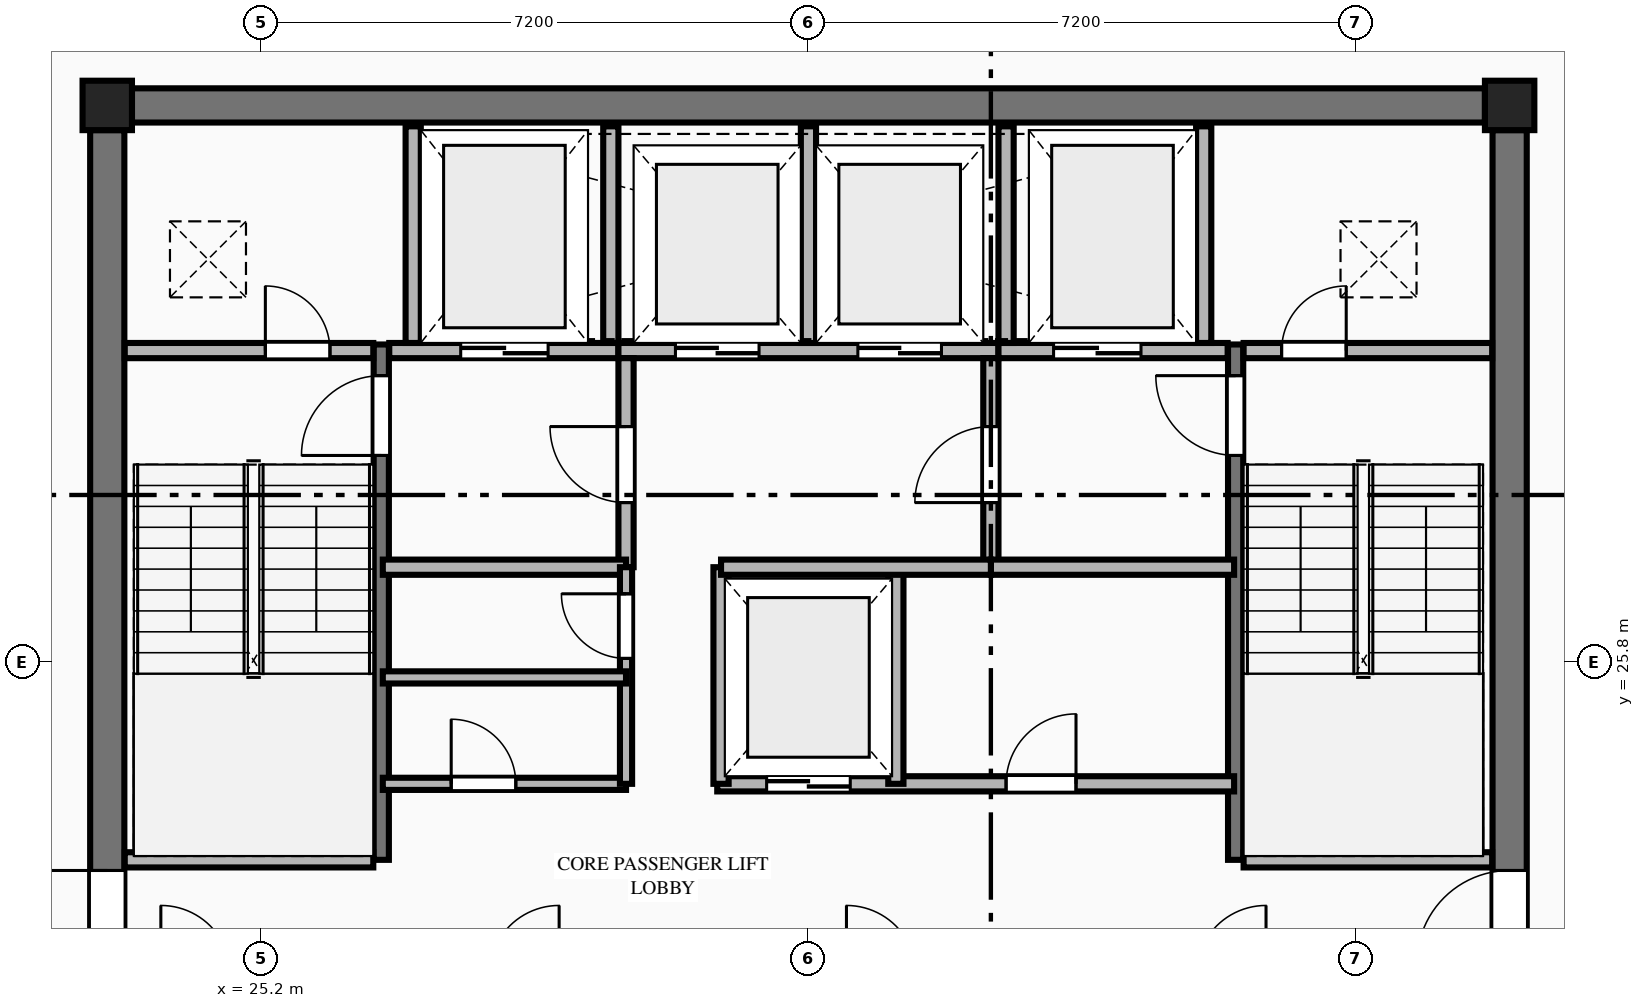
"""IFC4 building model, lengths in metres.
Left out: names, types, materials, properties, quantities, classifications, styles, units other than length and angle.
Written with IfcOpenShell. Run it as: python <this file> out.ifc"""

import sys

from ifc_helpers import new_model, si_unit, direction, frame, frame_2d, origin, origin_2d, place, context, subcontext, project, spatial, rectangle, extrude, element, fill, save


model = new_model("IFC4")
c1 = context("Model", 3, precision=1e-05, world=origin(), true_north=direction((0.0, 1.0)))
c2 = subcontext(c1, "Body", "Model", "MODEL_VIEW")
j1 = project(units=[si_unit("LENGTHUNIT", "METRE"), si_unit("PLANEANGLEUNIT", "RADIAN")], contexts=[c1])
p1 = place(None, origin())
s1 = spatial("IfcSite", under=j1, at=p1, CompositionType="ELEMENT")
p2 = place(p1, origin())
s2 = spatial("IfcBuilding", under=s1, at=p2, CompositionType="ELEMENT")
p3 = place(p2, frame((0.0, 0.0, 256.2)))
s3 = spatial("IfcBuildingStorey", under=s2, at=p3, CompositionType="ELEMENT", Elevation=256.2)
for number, where, z_axis, x_axis in (
    (1, (41.625, 33.125, 0.0), (0.0, 0.0, 1.0), (1.0, 0.0, 0.0)),
    (2, (23.175, 33.125, 0.0), (0.0, 0.0, 1.0), (1.0, 0.0, 0.0)),
):
    element("IfcColumn", number, at=place(p3, frame(where, z_axis=z_axis, x_axis=x_axis)), inside=s3, PredefinedType="COLUMN", context=c2, shape_type="SweptSolid", body=[
        extrude(rectangle(XDim=0.65, YDim=0.65, at=origin_2d()), origin(), (0.0, 0.0, 1.0), 3.65),
    ])
p4 = place(p3, frame((23.5, 33.125, 0.0), z_axis=(0.0, 0.0, 1.0), x_axis=(1.0, 0.0, 0.0)))
e3 = element("IfcWall", 3, at=p4, inside=s3, PredefinedType="SHEAR", context=c2, shape_type="SweptSolid", body=[
    extrude(rectangle(XDim=17.8, YDim=0.45, at=frame_2d((8.9, 0.0))), origin(), (0.0, 0.0, 1.0), 3.45),
])
p5 = place(p3, frame((23.175, 19.0, 0.0), z_axis=(0.0, 0.0, 1.0), x_axis=(0.0, 1.0, 0.0)))
e4 = element("IfcWall", 4, at=p5, inside=s3, PredefinedType="SHEAR", context=c2, shape_type="SweptSolid", body=[
    extrude(rectangle(XDim=13.8, YDim=0.45, at=frame_2d((6.9, 0.0))), origin(), (0.0, 0.0, 1.0), 3.45),
])
p6 = place(p5, frame((2.84, 0.0, 0.0)))
e5 = element("IfcOpeningElement", 5, at=p6, cuts=e4, PredefinedType="OPENING", context=c2, shape_type="SweptSolid", body=[
    extrude(rectangle(XDim=1.22, YDim=2.25, at=frame_2d((0.61, 1.125))), frame((0.0, 0.235, 0.0), z_axis=(0.0, -1.0, 0.0), x_axis=(1.0, 0.0, 0.0)), (0.0, 0.0, 1.0), 0.47),
])
p7 = place(p3, frame((41.625, 19.0, 0.0), z_axis=(0.0, 0.0, 1.0), x_axis=(0.0, 1.0, 0.0)))
e6 = element("IfcWall", 6, at=p7, inside=s3, PredefinedType="SHEAR", context=c2, shape_type="SweptSolid", body=[
    extrude(rectangle(XDim=13.8, YDim=0.45, at=frame_2d((6.9, 0.0))), origin(), (0.0, 0.0, 1.0), 3.45),
])
p8 = place(p7, frame((2.84, 0.0, 0.0)))
e7 = element("IfcOpeningElement", 7, at=p8, cuts=e6, PredefinedType="OPENING", context=c2, shape_type="SweptSolid", body=[
    extrude(rectangle(XDim=1.22, YDim=2.25, at=frame_2d((0.61, 1.125))), frame((0.0, 0.235, 0.0), z_axis=(0.0, -1.0, 0.0), x_axis=(1.0, 0.0, 0.0)), (0.0, 0.0, 1.0), 0.47),
])
p9 = place(p3, frame((26.78, 23.2, 0.0), z_axis=(0.0, 0.0, 1.0), x_axis=(0.0, 1.0, 0.0)))
e8 = element("IfcWall", 8, at=p9, inside=s3, PredefinedType="SHEAR", context=c2, shape_type="SweptSolid", body=[
    extrude(rectangle(XDim=6.78, YDim=0.2, at=frame_2d((3.39, 0.0))), origin(), (0.0, 0.0, 1.0), 3.65),
])
p10 = place(p9, frame((5.32, 0.0, 0.0)))
e9 = element("IfcOpeningElement", 9, at=p10, cuts=e8, PredefinedType="OPENING", context=c2, shape_type="SweptSolid", body=[
    extrude(rectangle(XDim=1.05, YDim=2.15, at=frame_2d((0.525, 1.075))), frame((0.0, 0.11, 0.0), z_axis=(0.0, -1.0, 0.0), x_axis=(1.0, 0.0, 0.0)), (0.0, 0.0, 1.0), 0.22),
])
p11 = place(p3, frame((23.405, 23.2, 0.0), z_axis=(0.0, 0.0, 1.0), x_axis=(1.0, 0.0, 0.0)))
e10 = element("IfcWall", 10, at=p11, inside=s3, PredefinedType="PLUMBINGWALL", context=c2, shape_type="SweptSolid", body=[
    extrude(rectangle(XDim=3.27, YDim=0.2, at=frame_2d((1.635, 0.0))), origin(), (0.0, 0.0, 1.0), 3.45),
])
p12 = place(p3, frame((38.02, 23.2, 0.0), z_axis=(0.0, 0.0, 1.0), x_axis=(0.0, 1.0, 0.0)))
e11 = element("IfcWall", 11, at=p12, inside=s3, PredefinedType="SHEAR", context=c2, shape_type="SweptSolid", body=[
    extrude(rectangle(XDim=6.78, YDim=0.2, at=frame_2d((3.39, 0.0))), origin(), (0.0, 0.0, 1.0), 3.65),
])
p13 = place(p12, frame((5.32, 0.0, 0.0)))
e12 = element("IfcOpeningElement", 12, at=p13, cuts=e11, PredefinedType="OPENING", context=c2, shape_type="SweptSolid", body=[
    extrude(rectangle(XDim=1.05, YDim=2.15, at=frame_2d((0.525, 1.075))), frame((0.0, 0.11, 0.0), z_axis=(0.0, -1.0, 0.0), x_axis=(1.0, 0.0, 0.0)), (0.0, 0.0, 1.0), 0.22),
])
p14 = place(p3, frame((38.125, 23.2, 0.0), z_axis=(0.0, 0.0, 1.0), x_axis=(1.0, 0.0, 0.0)))
e13 = element("IfcWall", 13, at=p14, inside=s3, PredefinedType="PLUMBINGWALL", context=c2, shape_type="SweptSolid", body=[
    extrude(rectangle(XDim=3.27, YDim=0.2, at=frame_2d((1.635, 0.0))), origin(), (0.0, 0.0, 1.0), 3.45),
])
p15 = place(p3, frame((23.405, 29.9, 0.0), z_axis=(0.0, 0.0, 1.0), x_axis=(1.0, 0.0, 0.0)))
e14 = element("IfcWall", 14, at=p15, inside=s3, PredefinedType="PLUMBINGWALL", context=c2, shape_type="SweptSolid", body=[
    extrude(rectangle(XDim=3.27, YDim=0.2, at=frame_2d((1.635, 0.0))), origin(), (0.0, 0.0, 1.0), 3.45),
])
p16 = place(p15, frame((1.85, 0.0, 0.0)))
e15 = element("IfcOpeningElement", 15, at=p16, cuts=e14, PredefinedType="OPENING", context=c2, shape_type="SweptSolid", body=[
    extrude(rectangle(XDim=0.85, YDim=2.05, at=frame_2d((0.425, 1.025))), frame((0.0, 0.11, 0.0), z_axis=(0.0, -1.0, 0.0), x_axis=(1.0, 0.0, 0.0)), (0.0, 0.0, 1.0), 0.22),
])
p17 = place(p3, frame((26.885, 29.9, 0.0), z_axis=(0.0, 0.0, 1.0), x_axis=(1.0, 0.0, 0.0)))
e16 = element("IfcWall", 16, at=p17, inside=s3, PredefinedType="PLUMBINGWALL", context=c2, shape_type="SweptSolid", body=[
    extrude(rectangle(XDim=3.015, YDim=0.2, at=frame_2d((1.507, 0.0))), origin(), (0.0, 0.0, 1.0), 3.45),
])
p18 = place(p17, frame((0.94, 0.0, 0.0)))
e17 = element("IfcOpeningElement", 17, at=p18, cuts=e16, PredefinedType="OPENING", context=c2, shape_type="SweptSolid", body=[
    extrude(rectangle(XDim=1.15, YDim=2.2, at=frame_2d((0.575, 1.1))), frame((0.0, 0.11, 0.0), z_axis=(0.0, -1.0, 0.0), x_axis=(1.0, 0.0, 0.0)), (0.0, 0.0, 1.0), 0.22),
])
p19 = place(p3, frame((29.9, 29.9, 0.0), z_axis=(0.0, 0.0, 1.0), x_axis=(1.0, 0.0, 0.0)))
e18 = element("IfcWall", 18, at=p19, inside=s3, PredefinedType="PLUMBINGWALL", context=c2, shape_type="SweptSolid", body=[
    extrude(rectangle(XDim=5.0, YDim=0.2, at=frame_2d((2.5, 0.0))), origin(), (0.0, 0.0, 1.0), 3.45),
])
p20 = place(p19, frame((0.75, 0.0, 0.0)))
e19 = element("IfcOpeningElement", 19, at=p20, cuts=e18, PredefinedType="OPENING", context=c2, shape_type="SweptSolid", body=[
    extrude(rectangle(XDim=1.1, YDim=2.2, at=frame_2d((0.55, 1.1))), frame((0.0, 0.11, 0.0), z_axis=(0.0, -1.0, 0.0), x_axis=(1.0, 0.0, 0.0)), (0.0, 0.0, 1.0), 0.22),
])
p21 = place(p19, frame((3.15, 0.0, 0.0)))
e20 = element("IfcOpeningElement", 20, at=p21, cuts=e18, PredefinedType="OPENING", context=c2, shape_type="SweptSolid", body=[
    extrude(rectangle(XDim=1.1, YDim=2.2, at=frame_2d((0.55, 1.1))), frame((0.0, 0.11, 0.0), z_axis=(0.0, -1.0, 0.0), x_axis=(1.0, 0.0, 0.0)), (0.0, 0.0, 1.0), 0.22),
])
p22 = place(p3, frame((34.9, 29.9, 0.0), z_axis=(0.0, 0.0, 1.0), x_axis=(1.0, 0.0, 0.0)))
e21 = element("IfcWall", 21, at=p22, inside=s3, PredefinedType="PLUMBINGWALL", context=c2, shape_type="SweptSolid", body=[
    extrude(rectangle(XDim=3.015, YDim=0.2, at=frame_2d((1.508, 0.0))), origin(), (0.0, 0.0, 1.0), 3.45),
])
p23 = place(p22, frame((0.725, 0.0, 0.0)))
e22 = element("IfcOpeningElement", 22, at=p23, cuts=e21, PredefinedType="OPENING", context=c2, shape_type="SweptSolid", body=[
    extrude(rectangle(XDim=1.15, YDim=2.2, at=frame_2d((0.575, 1.1))), frame((0.0, 0.11, 0.0), z_axis=(0.0, -1.0, 0.0), x_axis=(1.0, 0.0, 0.0)), (0.0, 0.0, 1.0), 0.22),
])
p24 = place(p3, frame((38.125, 29.9, 0.0), z_axis=(0.0, 0.0, 1.0), x_axis=(1.0, 0.0, 0.0)))
e23 = element("IfcWall", 23, at=p24, inside=s3, PredefinedType="PLUMBINGWALL", context=c2, shape_type="SweptSolid", body=[
    extrude(rectangle(XDim=3.27, YDim=0.2, at=frame_2d((1.635, 0.0))), origin(), (0.0, 0.0, 1.0), 3.45),
])
p25 = place(p24, frame((0.5, 0.0, 0.0)))
e24 = element("IfcOpeningElement", 24, at=p25, cuts=e23, PredefinedType="OPENING", context=c2, shape_type="SweptSolid", body=[
    extrude(rectangle(XDim=0.85, YDim=2.05, at=frame_2d((0.425, 1.025))), frame((0.0, 0.11, 0.0), z_axis=(0.0, -1.0, 0.0), x_axis=(1.0, 0.0, 0.0)), (0.0, 0.0, 1.0), 0.22),
])
for number, where, z_axis, x_axis in (
    (25, (27.2, 30.0, 0.0), (0.0, 0.0, 1.0), (0.0, 1.0, 0.0)),
    (26, (29.8, 30.0, 0.0), (0.0, 0.0, 1.0), (0.0, 1.0, 0.0)),
    (27, (32.4, 30.0, 0.0), (0.0, 0.0, 1.0), (0.0, 1.0, 0.0)),
    (28, (35.0, 30.0, 0.0), (0.0, 0.0, 1.0), (0.0, 1.0, 0.0)),
    (29, (37.6, 30.0, 0.0), (0.0, 0.0, 1.0), (0.0, 1.0, 0.0)),
):
    element("IfcWall", number, at=place(p3, frame(where, z_axis=z_axis, x_axis=x_axis)), inside=s3, PredefinedType="PLUMBINGWALL", context=c2, shape_type="SweptSolid", body=[
        extrude(rectangle(XDim=2.85, YDim=0.2, at=frame_2d((1.425, 0.0))), origin(), (0.0, 0.0, 1.0), 3.45),
    ])
p26 = place(p3, frame((30.0, 27.05, 0.0), z_axis=(0.0, 0.0, 1.0), x_axis=(0.0, 1.0, 0.0)))
e30 = element("IfcWall", 30, at=p26, inside=s3, PredefinedType="PLUMBINGWALL", context=c2, shape_type="SweptSolid", body=[
    extrude(rectangle(XDim=2.75, YDim=0.2, at=frame_2d((1.375, 0.0))), origin(), (0.0, 0.0, 1.0), 3.45),
])
p27 = place(p26, frame((0.85, 0.0, 0.0)))
e31 = element("IfcOpeningElement", 31, at=p27, cuts=e30, PredefinedType="OPENING", context=c2, shape_type="SweptSolid", body=[
    extrude(rectangle(XDim=1.0, YDim=2.15, at=frame_2d((0.5, 1.075))), frame((0.0, 0.11, 0.0), z_axis=(0.0, -1.0, 0.0), x_axis=(1.0, 0.0, 0.0)), (0.0, 0.0, 1.0), 0.22),
])
p28 = place(p3, frame((26.8, 27.05, 0.0), z_axis=(0.0, 0.0, 1.0), x_axis=(1.0, 0.0, 0.0)))
e32 = element("IfcWall", 32, at=p28, inside=s3, PredefinedType="PLUMBINGWALL", context=c2, shape_type="SweptSolid", body=[
    extrude(rectangle(XDim=3.2, YDim=0.2, at=frame_2d((1.6, 0.0))), origin(), (0.0, 0.0, 1.0), 3.45),
])
p29 = place(p3, frame((34.8, 27.05, 0.0), z_axis=(0.0, 0.0, 1.0), x_axis=(0.0, 1.0, 0.0)))
e33 = element("IfcWall", 33, at=p29, inside=s3, PredefinedType="PLUMBINGWALL", context=c2, shape_type="SweptSolid", body=[
    extrude(rectangle(XDim=2.75, YDim=0.2, at=frame_2d((1.375, 0.0))), origin(), (0.0, 0.0, 1.0), 3.45),
])
p30 = place(p29, frame((0.85, 0.0, 0.0)))
e34 = element("IfcOpeningElement", 34, at=p30, cuts=e33, PredefinedType="OPENING", context=c2, shape_type="SweptSolid", body=[
    extrude(rectangle(XDim=1.0, YDim=2.15, at=frame_2d((0.5, 1.075))), frame((0.0, 0.11, 0.0), z_axis=(0.0, -1.0, 0.0), x_axis=(1.0, 0.0, 0.0)), (0.0, 0.0, 1.0), 0.22),
])
p31 = place(p3, frame((34.8, 27.05, 0.0), z_axis=(0.0, 0.0, 1.0), x_axis=(1.0, 0.0, 0.0)))
e35 = element("IfcWall", 35, at=p31, inside=s3, PredefinedType="PLUMBINGWALL", context=c2, shape_type="SweptSolid", body=[
    extrude(rectangle(XDim=3.2, YDim=0.2, at=frame_2d((1.6, 0.0))), origin(), (0.0, 0.0, 1.0), 3.45),
])
p32 = place(p3, frame((26.8, 24.2, 0.0), z_axis=(0.0, 0.0, 1.0), x_axis=(1.0, 0.0, 0.0)))
e36 = element("IfcWall", 36, at=p32, inside=s3, PredefinedType="PARTITIONING", context=c2, shape_type="SweptSolid", body=[
    extrude(rectangle(XDim=3.2, YDim=0.16, at=frame_2d((1.6, 0.0))), origin(), (0.0, 0.0, 1.0), 3.45),
])
p33 = place(p32, frame((0.9, 0.0, 0.0)))
e37 = element("IfcOpeningElement", 37, at=p33, cuts=e36, PredefinedType="OPENING", context=c2, shape_type="SweptSolid", body=[
    extrude(rectangle(XDim=0.85, YDim=2.05, at=frame_2d((0.425, 1.025))), frame((0.0, 0.09, 0.0), z_axis=(0.0, -1.0, 0.0), x_axis=(1.0, 0.0, 0.0)), (0.0, 0.0, 1.0), 0.18),
])
p34 = place(p3, frame((30.0, 24.2, 0.0), z_axis=(0.0, 0.0, 1.0), x_axis=(0.0, 1.0, 0.0)))
e38 = element("IfcWall", 38, at=p34, inside=s3, PredefinedType="PARTITIONING", context=c2, shape_type="SweptSolid", body=[
    extrude(rectangle(XDim=2.85, YDim=0.16, at=frame_2d((1.425, 0.0))), origin(), (0.0, 0.0, 1.0), 3.45),
])
p35 = place(p34, frame((1.65, 0.0, 0.0)))
e39 = element("IfcOpeningElement", 39, at=p35, cuts=e38, PredefinedType="OPENING", context=c2, shape_type="SweptSolid", body=[
    extrude(rectangle(XDim=0.85, YDim=2.05, at=frame_2d((0.425, 1.025))), frame((0.0, 0.09, 0.0), z_axis=(0.0, -1.0, 0.0), x_axis=(1.0, 0.0, 0.0)), (0.0, 0.0, 1.0), 0.18),
])
p36 = place(p3, frame((31.2, 24.2, 0.0), z_axis=(0.0, 0.0, 1.0), x_axis=(1.0, 0.0, 0.0)))
e40 = element("IfcWall", 40, at=p36, inside=s3, PredefinedType="PLUMBINGWALL", context=c2, shape_type="SweptSolid", body=[
    extrude(rectangle(XDim=6.8, YDim=0.2, at=frame_2d((3.4, 0.0))), origin(), (0.0, 0.0, 1.0), 3.45),
])
p37 = place(p36, frame((0.65, 0.0, 0.0)))
e41 = element("IfcOpeningElement", 41, at=p37, cuts=e40, PredefinedType="OPENING", context=c2, shape_type="SweptSolid", body=[
    extrude(rectangle(XDim=1.1, YDim=2.2, at=frame_2d((0.55, 1.1))), frame((0.0, 0.11, 0.0), z_axis=(0.0, -1.0, 0.0), x_axis=(1.0, 0.0, 0.0)), (0.0, 0.0, 1.0), 0.22),
])
p38 = place(p36, frame((3.8, 0.0, 0.0)))
e42 = element("IfcOpeningElement", 42, at=p38, cuts=e40, PredefinedType="OPENING", context=c2, shape_type="SweptSolid", body=[
    extrude(rectangle(XDim=0.92, YDim=2.15, at=frame_2d((0.46, 1.075))), frame((0.0, 0.11, 0.0), z_axis=(0.0, -1.0, 0.0), x_axis=(1.0, 0.0, 0.0)), (0.0, 0.0, 1.0), 0.22),
])
for number, where, z_axis, x_axis in (
    (43, (31.25, 24.2, 0.0), (0.0, 0.0, 1.0), (0.0, 1.0, 0.0)),
    (44, (33.55, 24.2, 0.0), (0.0, 0.0, 1.0), (0.0, 1.0, 0.0)),
):
    element("IfcWall", number, at=place(p3, frame(where, z_axis=z_axis, x_axis=x_axis)), inside=s3, PredefinedType="PLUMBINGWALL", context=c2, shape_type="SweptSolid", body=[
        extrude(rectangle(XDim=2.85, YDim=0.2, at=frame_2d((1.425, 0.0))), origin(), (0.0, 0.0, 1.0), 3.45),
    ])
p39 = place(p3, frame((31.25, 27.05, 0.0), z_axis=(0.0, 0.0, 1.0), x_axis=(1.0, 0.0, 0.0)))
e45 = element("IfcWall", 45, at=p39, inside=s3, PredefinedType="PLUMBINGWALL", context=c2, shape_type="SweptSolid", body=[
    extrude(rectangle(XDim=3.55, YDim=0.2, at=frame_2d((1.775, 0.0))), origin(), (0.0, 0.0, 1.0), 3.45),
])
p40 = place(p3, frame((26.8, 25.6, 0.0), z_axis=(0.0, 0.0, 1.0), x_axis=(1.0, 0.0, 0.0)))
e46 = element("IfcWall", 46, at=p40, inside=s3, PredefinedType="PARTITIONING", context=c2, shape_type="SweptSolid", body=[
    extrude(rectangle(XDim=3.2, YDim=0.16, at=frame_2d((1.6, 0.0))), origin(), (0.0, 0.0, 1.0), 3.45),
])
p41 = place(p6, origin())
e47 = element("IfcDoor", 47, at=p41, inside=s3, OperationType="SINGLE_SWING_RIGHT", PredefinedType="DOOR", context=c2, shape_type="SweptSolid", body=[
    extrude(rectangle(XDim=1.22, YDim=2.25, at=frame_2d((0.61, 1.125))), frame((0.0, 0.025, 0.0), z_axis=(0.0, -1.0, 0.0), x_axis=(1.0, 0.0, 0.0)), (0.0, 0.0, 1.0), 0.05),
])
fill(e5, e47)
p42 = place(p8, origin())
e48 = element("IfcDoor", 48, at=p42, inside=s3, OperationType="SINGLE_SWING_LEFT", PredefinedType="DOOR", context=c2, shape_type="SweptSolid", body=[
    extrude(rectangle(XDim=1.22, YDim=2.25, at=frame_2d((0.61, 1.125))), frame((0.0, 0.025, 0.0), z_axis=(0.0, -1.0, 0.0), x_axis=(1.0, 0.0, 0.0)), (0.0, 0.0, 1.0), 0.05),
])
fill(e7, e48)
p43 = place(p10, origin())
e49 = element("IfcDoor", 49, at=p43, inside=s3, OperationType="SINGLE_SWING_LEFT", PredefinedType="DOOR", context=c2, shape_type="SweptSolid", body=[
    extrude(rectangle(XDim=1.05, YDim=2.15, at=frame_2d((0.525, 1.075))), frame((0.0, 0.025, 0.0), z_axis=(0.0, -1.0, 0.0), x_axis=(1.0, 0.0, 0.0)), (0.0, 0.0, 1.0), 0.05),
])
fill(e9, e49)
p44 = place(p13, origin())
e50 = element("IfcDoor", 50, at=p44, inside=s3, OperationType="SINGLE_SWING_RIGHT", PredefinedType="DOOR", context=c2, shape_type="SweptSolid", body=[
    extrude(rectangle(XDim=1.05, YDim=2.15, at=frame_2d((0.525, 1.075))), frame((0.0, 0.025, 0.0), z_axis=(0.0, -1.0, 0.0), x_axis=(1.0, 0.0, 0.0)), (0.0, 0.0, 1.0), 0.05),
])
fill(e12, e50)
p45 = place(p16, origin())
e51 = element("IfcDoor", 51, at=p45, inside=s3, OperationType="SINGLE_SWING_LEFT", PredefinedType="DOOR", context=c2, shape_type="SweptSolid", body=[
    extrude(rectangle(XDim=0.85, YDim=2.05, at=frame_2d((0.425, 1.025))), frame((0.0, 0.025, 0.0), z_axis=(0.0, -1.0, 0.0), x_axis=(1.0, 0.0, 0.0)), (0.0, 0.0, 1.0), 0.05),
])
fill(e15, e51)
p46 = place(p25, origin())
e52 = element("IfcDoor", 52, at=p46, inside=s3, OperationType="SINGLE_SWING_RIGHT", PredefinedType="DOOR", context=c2, shape_type="SweptSolid", body=[
    extrude(rectangle(XDim=0.85, YDim=2.05, at=frame_2d((0.425, 1.025))), frame((0.0, 0.025, 0.0), z_axis=(0.0, -1.0, 0.0), x_axis=(1.0, 0.0, 0.0)), (0.0, 0.0, 1.0), 0.05),
])
fill(e24, e52)
p47 = place(p18, origin())
e53 = element("IfcDoor", 53, at=p47, inside=s3, OperationType="DOUBLE_DOOR_SLIDING", PredefinedType="DOOR", context=c2, shape_type="SweptSolid", body=[
    extrude(rectangle(XDim=1.15, YDim=2.2, at=frame_2d((0.575, 1.1))), frame((0.0, 0.025, 0.0), z_axis=(0.0, -1.0, 0.0), x_axis=(1.0, 0.0, 0.0)), (0.0, 0.0, 1.0), 0.05),
])
fill(e17, e53)
p48 = place(p23, origin())
e54 = element("IfcDoor", 54, at=p48, inside=s3, OperationType="DOUBLE_DOOR_SLIDING", PredefinedType="DOOR", context=c2, shape_type="SweptSolid", body=[
    extrude(rectangle(XDim=1.15, YDim=2.2, at=frame_2d((0.575, 1.1))), frame((0.0, 0.025, 0.0), z_axis=(0.0, -1.0, 0.0), x_axis=(1.0, 0.0, 0.0)), (0.0, 0.0, 1.0), 0.05),
])
fill(e22, e54)
p49 = place(p20, origin())
e55 = element("IfcDoor", 55, at=p49, inside=s3, OperationType="DOUBLE_DOOR_SLIDING", PredefinedType="DOOR", context=c2, shape_type="SweptSolid", body=[
    extrude(rectangle(XDim=1.1, YDim=2.2, at=frame_2d((0.55, 1.1))), frame((0.0, 0.025, 0.0), z_axis=(0.0, -1.0, 0.0), x_axis=(1.0, 0.0, 0.0)), (0.0, 0.0, 1.0), 0.05),
])
fill(e19, e55)
p50 = place(p21, origin())
e56 = element("IfcDoor", 56, at=p50, inside=s3, OperationType="DOUBLE_DOOR_SLIDING", PredefinedType="DOOR", context=c2, shape_type="SweptSolid", body=[
    extrude(rectangle(XDim=1.1, YDim=2.2, at=frame_2d((0.55, 1.1))), frame((0.0, 0.025, 0.0), z_axis=(0.0, -1.0, 0.0), x_axis=(1.0, 0.0, 0.0)), (0.0, 0.0, 1.0), 0.05),
])
fill(e20, e56)
p51 = place(p27, origin())
e57 = element("IfcDoor", 57, at=p51, inside=s3, OperationType="SINGLE_SWING_RIGHT", PredefinedType="DOOR", context=c2, shape_type="SweptSolid", body=[
    extrude(rectangle(XDim=1.0, YDim=2.15, at=frame_2d((0.5, 1.075))), frame((0.0, 0.025, 0.0), z_axis=(0.0, -1.0, 0.0), x_axis=(1.0, 0.0, 0.0)), (0.0, 0.0, 1.0), 0.05),
])
fill(e31, e57)
p52 = place(p30, origin())
e58 = element("IfcDoor", 58, at=p52, inside=s3, OperationType="SINGLE_SWING_LEFT", PredefinedType="DOOR", context=c2, shape_type="SweptSolid", body=[
    extrude(rectangle(XDim=1.0, YDim=2.15, at=frame_2d((0.5, 1.075))), frame((0.0, 0.025, 0.0), z_axis=(0.0, -1.0, 0.0), x_axis=(1.0, 0.0, 0.0)), (0.0, 0.0, 1.0), 0.05),
])
fill(e34, e58)
p53 = place(p37, origin())
e59 = element("IfcDoor", 59, at=p53, inside=s3, OperationType="DOUBLE_DOOR_SLIDING", PredefinedType="DOOR", context=c2, shape_type="SweptSolid", body=[
    extrude(rectangle(XDim=1.1, YDim=2.2, at=frame_2d((0.55, 1.1))), frame((0.0, 0.025, 0.0), z_axis=(0.0, -1.0, 0.0), x_axis=(1.0, 0.0, 0.0)), (0.0, 0.0, 1.0), 0.05),
])
fill(e41, e59)
p54 = place(p33, origin())
e60 = element("IfcDoor", 60, at=p54, inside=s3, OperationType="SINGLE_SWING_LEFT", PredefinedType="DOOR", context=c2, shape_type="SweptSolid", body=[
    extrude(rectangle(XDim=0.85, YDim=2.05, at=frame_2d((0.425, 1.025))), frame((0.0, 0.025, 0.0), z_axis=(0.0, -1.0, 0.0), x_axis=(1.0, 0.0, 0.0)), (0.0, 0.0, 1.0), 0.05),
])
fill(e37, e60)
p55 = place(p35, origin())
e61 = element("IfcDoor", 61, at=p55, inside=s3, OperationType="SINGLE_SWING_RIGHT", PredefinedType="DOOR", context=c2, shape_type="SweptSolid", body=[
    extrude(rectangle(XDim=0.85, YDim=2.05, at=frame_2d((0.425, 1.025))), frame((0.0, 0.025, 0.0), z_axis=(0.0, -1.0, 0.0), x_axis=(1.0, 0.0, 0.0)), (0.0, 0.0, 1.0), 0.05),
])
fill(e39, e61)
p56 = place(p38, origin())
e62 = element("IfcDoor", 62, at=p56, inside=s3, OperationType="SINGLE_SWING_RIGHT", PredefinedType="DOOR", context=c2, shape_type="SweptSolid", body=[
    extrude(rectangle(XDim=0.92, YDim=2.15, at=frame_2d((0.46, 1.075))), frame((0.0, 0.025, 0.0), z_axis=(0.0, -1.0, 0.0), x_axis=(1.0, 0.0, 0.0)), (0.0, 0.0, 1.0), 0.05),
])
fill(e42, e62)
save(model, sys.argv[1])
